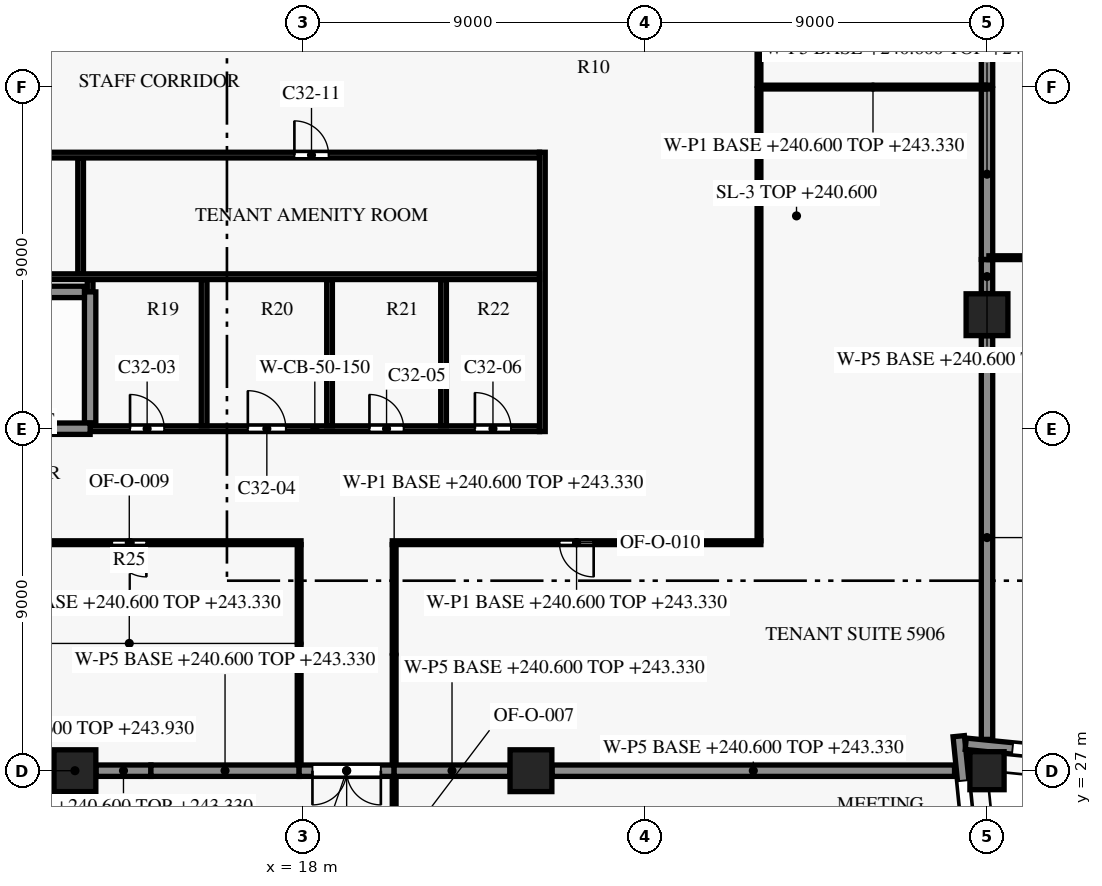
"""IFC4 building model, lengths in metres.
Left out: names, types, materials, properties, quantities, classifications, styles, units other than length and angle.
Written with IfcOpenShell. Run it as: python <this file> out.ifc"""

import sys

from ifc_helpers import new_model, si_unit, direction, frame, frame_2d, origin, origin_2d, place, context, subcontext, project, spatial, rectangle, extrude, element, fill, save


model = new_model("IFC4")
c1 = context("Model", 3, precision=1e-05, world=origin(), true_north=direction((0.0, 1.0)))
c2 = subcontext(c1, "Body", "Model", "MODEL_VIEW")
j1 = project(units=[si_unit("LENGTHUNIT", "METRE"), si_unit("PLANEANGLEUNIT", "RADIAN")], contexts=[c1])
p1 = place(None, origin())
s1 = spatial("IfcSite", under=j1, at=p1, CompositionType="ELEMENT")
p2 = place(p1, origin())
s2 = spatial("IfcBuilding", under=s1, at=p2, CompositionType="ELEMENT")
p3 = place(p2, frame((0.0, 0.0, 240.6)))
s3 = spatial("IfcBuildingStorey", under=s2, at=p3, CompositionType="ELEMENT", Elevation=240.6)
p4 = place(p3, frame((36.0, 27.0, 0.0), z_axis=(0.0, 0.0, 1.0), x_axis=(-0.0995038382, 0.995037178292, 0.0)))
e1 = element("IfcColumn", 1, at=p4, inside=s3, PredefinedType="COLUMN", context=c2, shape_type="SweptSolid", body=[
    extrude(rectangle(XDim=0.9, YDim=1.0, at=origin_2d()), origin(), (0.0, 0.0, 1.0), 3.8),
])
for number, where, z_axis, x_axis in (
    (2, (12.0, 27.0, 0.0), (0.0, 0.0, 1.0), (1.0, 0.0, 0.0)),
    (3, (24.0, 27.0, 0.0), (0.0, 0.0, 1.0), (1.0, 0.0, 0.0)),
    (4, (36.0, 39.0, 0.0), (0.0, 0.0, 1.0), (1.0, 0.0, 0.0)),
):
    element("IfcColumn", number, at=place(p3, frame(where, z_axis=z_axis, x_axis=x_axis)), inside=s3, PredefinedType="COLUMN", context=c2, shape_type="SweptSolid", body=[
        extrude(rectangle(XDim=1.1, YDim=1.1, at=origin_2d()), origin(), (0.0, 0.0, 1.0), 3.8),
    ])
p5 = place(p3, frame((35.256, 27.908, 0.0), z_axis=(0.0, 0.0, 1.0), x_axis=(0.099535070904, -0.995034054523, 0.0)))
e5 = element("IfcWall", 5, at=p5, inside=s3, PredefinedType="SOLIDWALL", context=c2, shape_type="SweptSolid", body=[
    extrude(rectangle(XDim=4.626, YDim=0.3, at=frame_2d((2.313, 0.0))), origin(), (0.0, 0.0, 1.0), 3.15),
])
p6 = place(p5, frame((1.176, 0.0, 0.15)))
e6 = element("IfcOpeningElement", 6, at=p6, cuts=e5, PredefinedType="OPENING", context=c2, shape_type="SweptSolid", body=[
    extrude(rectangle(XDim=3.3, YDim=2.4, at=frame_2d((1.65, 1.2))), frame((0.0, 0.16, 0.0), z_axis=(0.0, -1.0, 0.0), x_axis=(1.0, 0.0, 0.0)), (0.0, 0.0, 1.0), 0.32),
])
p7 = place(p3, frame((45.015, 26.752, 0.0), z_axis=(0.0, 0.0, 1.0), x_axis=(-0.9950379439, 0.099496181828, 0.0)))
e7 = element("IfcWall", 7, at=p7, inside=s3, PredefinedType="SOLIDWALL", context=c2, shape_type="SweptSolid", body=[
    extrude(rectangle(XDim=9.621, YDim=0.3, at=frame_2d((4.811, 0.0))), origin(), (0.0, 0.0, 1.0), 3.15),
])
p8 = place(p7, frame((1.311, 0.0, 0.75)))
e8 = element("IfcOpeningElement", 8, at=p8, cuts=e7, PredefinedType="OPENING", context=c2, shape_type="SweptSolid", body=[
    extrude(rectangle(XDim=1.8, YDim=1.8, at=frame_2d((0.9, 0.9))), frame((0.0, 0.16, 0.0), z_axis=(0.0, -1.0, 0.0), x_axis=(1.0, 0.0, 0.0)), (0.0, 0.0, 1.0), 0.32),
])
p9 = place(p7, frame((5.083, 0.0, 0.15)))
e9 = element("IfcOpeningElement", 9, at=p9, cuts=e7, PredefinedType="OPENING", context=c2, shape_type="SweptSolid", body=[
    extrude(rectangle(XDim=3.3, YDim=2.4, at=frame_2d((1.65, 1.2))), frame((0.0, 0.16, 0.0), z_axis=(0.0, -1.0, 0.0), x_axis=(1.0, 0.0, 0.0)), (0.0, 0.0, 1.0), 0.32),
])
p10 = place(p3, frame((12.4, 36.0, 0.0), z_axis=(0.0, 0.0, 1.0), x_axis=(1.0, 0.0, 0.0)))
e10 = element("IfcWall", 10, at=p10, inside=s3, PredefinedType="SHEAR", context=c2, shape_type="SweptSolid", body=[
    extrude(rectangle(XDim=11.825, YDim=0.15, at=frame_2d((5.913, 0.0))), origin(), (0.0, 0.0, 1.0), 3.5),
])
p11 = place(p10, frame((1.05, 0.0, 0.0)))
e11 = element("IfcOpeningElement", 11, at=p11, cuts=e10, PredefinedType="OPENING", context=c2, shape_type="SweptSolid", body=[
    extrude(rectangle(XDim=0.9, YDim=2.1, at=frame_2d((0.45, 1.05))), frame((0.0, 0.085, 0.0), z_axis=(0.0, -1.0, 0.0), x_axis=(1.0, 0.0, 0.0)), (0.0, 0.0, 1.0), 0.17),
])
p12 = place(p10, frame((4.15, 0.0, 0.0)))
e12 = element("IfcOpeningElement", 12, at=p12, cuts=e10, PredefinedType="OPENING", context=c2, shape_type="SweptSolid", body=[
    extrude(rectangle(XDim=1.0, YDim=2.1, at=frame_2d((0.5, 1.05))), frame((0.0, 0.085, 0.0), z_axis=(0.0, -1.0, 0.0), x_axis=(1.0, 0.0, 0.0)), (0.0, 0.0, 1.0), 0.17),
])
p13 = place(p10, frame((7.35, 0.0, 0.0)))
e13 = element("IfcOpeningElement", 13, at=p13, cuts=e10, PredefinedType="OPENING", context=c2, shape_type="SweptSolid", body=[
    extrude(rectangle(XDim=0.9, YDim=2.1, at=frame_2d((0.45, 1.05))), frame((0.0, 0.085, 0.0), z_axis=(0.0, -1.0, 0.0), x_axis=(1.0, 0.0, 0.0)), (0.0, 0.0, 1.0), 0.17),
])
p14 = place(p10, frame((10.125, 0.0, 0.0)))
e14 = element("IfcOpeningElement", 14, at=p14, cuts=e10, PredefinedType="OPENING", context=c2, shape_type="SweptSolid", body=[
    extrude(rectangle(XDim=0.95, YDim=2.1, at=frame_2d((0.475, 1.05))), frame((0.0, 0.085, 0.0), z_axis=(0.0, -1.0, 0.0), x_axis=(1.0, 0.0, 0.0)), (0.0, 0.0, 1.0), 0.17),
])
p15 = place(p3, frame((4.4, 36.0, 0.0), z_axis=(0.0, 0.0, 1.0), x_axis=(1.0, 0.0, 0.0)))
e15 = element("IfcWall", 15, at=p15, inside=s3, PredefinedType="SHEAR", context=c2, shape_type="SweptSolid", body=[
    extrude(rectangle(XDim=8.0, YDim=0.3, at=frame_2d((4.0, 0.0))), origin(), (0.0, 0.0, 1.0), 3.5),
])
p16 = place(p15, frame((0.3, 0.0, 0.0)))
e16 = element("IfcOpeningElement", 16, at=p16, cuts=e15, PredefinedType="OPENING", context=c2, shape_type="SweptSolid", body=[
    extrude(rectangle(XDim=1.5, YDim=2.2, at=frame_2d((0.75, 1.1))), frame((0.0, 0.16, 0.0), z_axis=(0.0, -1.0, 0.0), x_axis=(1.0, 0.0, 0.0)), (0.0, 0.0, 1.0), 0.32),
])
p17 = place(p3, frame((4.55, 39.6, 0.0), z_axis=(0.0, 0.0, 1.0), x_axis=(1.0, 0.0, 0.0)))
e17 = element("IfcWall", 17, at=p17, inside=s3, PredefinedType="SHEAR", context=c2, shape_type="SweptSolid", body=[
    extrude(rectangle(XDim=7.7, YDim=0.3, at=frame_2d((3.85, 0.0))), origin(), (0.0, 0.0, 1.0), 3.5),
])
p18 = place(p3, frame((8.1, 40.0, 0.0), z_axis=(0.0, 0.0, 1.0), x_axis=(1.0, 0.0, 0.0)))
e18 = element("IfcWall", 18, at=p18, inside=s3, PredefinedType="PARTITIONING", context=c2, shape_type="SweptSolid", body=[
    extrude(rectangle(XDim=16.125, YDim=0.15, at=frame_2d((8.062, 0.0))), origin(), (0.0, 0.0, 1.0), 3.5),
])
p19 = place(p3, frame((8.1, 43.2, 0.0), z_axis=(0.0, 0.0, 1.0), x_axis=(1.0, 0.0, 0.0)))
e19 = element("IfcWall", 19, at=p19, inside=s3, PredefinedType="PARTITIONING", context=c2, shape_type="SweptSolid", body=[
    extrude(rectangle(XDim=16.125, YDim=0.15, at=frame_2d((8.062, 0.0))), origin(), (0.0, 0.0, 1.0), 3.5),
])
p20 = place(p19, frame((1.575, 0.0, 0.0)))
e20 = element("IfcOpeningElement", 20, at=p20, cuts=e19, PredefinedType="OPENING", context=c2, shape_type="SweptSolid", body=[
    extrude(rectangle(XDim=0.9, YDim=2.1, at=frame_2d((0.45, 1.05))), frame((0.0, 0.085, 0.0), z_axis=(0.0, -1.0, 0.0), x_axis=(1.0, 0.0, 0.0)), (0.0, 0.0, 1.0), 0.17),
])
p21 = place(p19, frame((9.675, 0.0, 0.0)))
e21 = element("IfcOpeningElement", 21, at=p21, cuts=e19, PredefinedType="OPENING", context=c2, shape_type="SweptSolid", body=[
    extrude(rectangle(XDim=0.9, YDim=2.1, at=frame_2d((0.45, 1.05))), frame((0.0, 0.085, 0.0), z_axis=(0.0, -1.0, 0.0), x_axis=(1.0, 0.0, 0.0)), (0.0, 0.0, 1.0), 0.17),
])
p22 = place(p3, frame((12.15, 40.075, 0.0), z_axis=(0.0, 0.0, 1.0), x_axis=(0.0, 1.0, 0.0)))
e22 = element("IfcWall", 22, at=p22, inside=s3, PredefinedType="PARTITIONING", context=c2, shape_type="SweptSolid", body=[
    extrude(rectangle(XDim=3.05, YDim=0.15, at=frame_2d((1.525, 0.0))), origin(), (0.0, 0.0, 1.0), 3.5),
])
p23 = place(p3, frame((12.4, 39.6, 0.0), z_axis=(0.0, 0.0, 1.0), x_axis=(0.0, 1.0, 0.0)))
e23 = element("IfcWall", 23, at=p23, inside=s3, PredefinedType="PARTITIONING", context=c2, shape_type="SweptSolid", body=[
    extrude(rectangle(XDim=0.325, YDim=0.15, at=frame_2d((0.163, 0.0))), origin(), (0.0, 0.0, 1.0), 3.5),
])
p24 = place(p3, frame((12.4, 36.15, 0.0), z_axis=(0.0, 0.0, 1.0), x_axis=(0.0, 1.0, 0.0)))
e24 = element("IfcWall", 24, at=p24, inside=s3, PredefinedType="SHEAR", context=c2, shape_type="SweptSolid", body=[
    extrude(rectangle(XDim=3.45, YDim=0.3, at=frame_2d((1.725, 0.0))), origin(), (0.0, 0.0, 1.0), 3.5),
])
for number, where, z_axis, x_axis in (
    (25, (15.4, 36.075, 0.0), (0.0, 0.0, 1.0), (0.0, 1.0, 0.0)),
    (26, (18.7, 36.075, 0.0), (0.0, 0.0, 1.0), (0.0, 1.0, 0.0)),
    (27, (21.7, 36.075, 0.0), (0.0, 0.0, 1.0), (0.0, 1.0, 0.0)),
):
    element("IfcWall", number, at=place(p3, frame(where, z_axis=z_axis, x_axis=x_axis)), inside=s3, PredefinedType="PARTITIONING", context=c2, shape_type="SweptSolid", body=[
        extrude(rectangle(XDim=3.85, YDim=0.15, at=frame_2d((1.925, 0.0))), origin(), (0.0, 0.0, 1.0), 3.5),
    ])
p25 = place(p3, frame((24.3, 35.925, 0.0), z_axis=(0.0, 0.0, 1.0), x_axis=(0.0, 1.0, 0.0)))
e28 = element("IfcWall", 28, at=p25, inside=s3, PredefinedType="PARTITIONING", context=c2, shape_type="SweptSolid", body=[
    extrude(rectangle(XDim=7.35, YDim=0.15, at=frame_2d((3.675, 0.0))), origin(), (0.0, 0.0, 1.0), 3.5),
])
p26 = place(p3, frame((20.4, 26.83, 0.0), z_axis=(0.0, 0.0, 1.0), x_axis=(0.0, -1.0, 0.0)))
e29 = element("IfcWall", 29, at=p26, inside=s3, PredefinedType="PARTITIONING", context=c2, shape_type="SweptSolid", body=[
    extrude(rectangle(XDim=4.28, YDim=0.1, at=frame_2d((2.14, 0.0))), origin(), (0.0, 0.0, 1.0), 2.73),
])
p27 = place(p26, frame((1.18, 0.0, 0.0)))
e30 = element("IfcOpeningElement", 30, at=p27, cuts=e29, PredefinedType="OPENING", context=c2, shape_type="SweptSolid", body=[
    extrude(rectangle(XDim=1.8, YDim=2.1, at=frame_2d((0.9, 1.05))), frame((0.0, 0.06, 0.0), z_axis=(0.0, -1.0, 0.0), x_axis=(1.0, 0.0, 0.0)), (0.0, 0.0, 1.0), 0.12),
])
p28 = place(p3, frame((10.9, 27.0, 0.0), z_axis=(0.0, 0.0, 1.0), x_axis=(1.0, 0.0, 0.0)))
e31 = element("IfcWall", 31, at=p28, inside=s3, PredefinedType="PARTITIONING", context=c2, shape_type="SweptSolid", body=[
    extrude(rectangle(XDim=0.545, YDim=0.3, at=frame_2d((0.272, 0.0))), origin(), (0.0, 0.0, 1.0), 3.33),
])
p29 = place(p3, frame((12.555, 27.0, 0.0), z_axis=(0.0, 0.0, 1.0), x_axis=(1.0, 0.0, 0.0)))
e32 = element("IfcWall", 32, at=p29, inside=s3, PredefinedType="PARTITIONING", context=c2, shape_type="SweptSolid", body=[
    extrude(rectangle(XDim=1.445, YDim=0.3, at=frame_2d((0.723, 0.0))), origin(), (0.0, 0.0, 1.0), 2.73),
])
p30 = place(p3, frame((14.0, 27.0, 0.0), z_axis=(0.0, 0.0, 1.0), x_axis=(1.0, 0.0, 0.0)))
e33 = element("IfcWall", 33, at=p30, inside=s3, PredefinedType="PARTITIONING", context=c2, shape_type="SweptSolid", body=[
    extrude(rectangle(XDim=3.9, YDim=0.3, at=frame_2d((1.95, 0.0))), origin(), (0.0, 0.0, 1.0), 2.73),
])
p31 = place(p3, frame((20.4, 27.0, 0.0), z_axis=(0.0, 0.0, 1.0), x_axis=(-1.0, 0.0, 0.0)))
e34 = element("IfcWall", 34, at=p31, inside=s3, PredefinedType="PARTITIONING", context=c2, shape_type="SweptSolid", body=[
    extrude(rectangle(XDim=2.5, YDim=0.3, at=frame_2d((1.25, 0.0))), origin(), (0.0, 0.0, 1.0), 2.73),
])
p32 = place(p31, frame((0.35, 0.0, 0.0)))
e35 = element("IfcOpeningElement", 35, at=p32, cuts=e34, PredefinedType="OPENING", context=c2, shape_type="SweptSolid", body=[
    extrude(rectangle(XDim=1.8, YDim=2.1, at=frame_2d((0.9, 1.05))), frame((0.0, 0.16, 0.0), z_axis=(0.0, -1.0, 0.0), x_axis=(1.0, 0.0, 0.0)), (0.0, 0.0, 1.0), 0.32),
])
p33 = place(p3, frame((20.4, 27.0, 0.0), z_axis=(0.0, 0.0, 1.0), x_axis=(1.0, 0.0, 0.0)))
e36 = element("IfcWall", 36, at=p33, inside=s3, PredefinedType="PARTITIONING", context=c2, shape_type="SweptSolid", body=[
    extrude(rectangle(XDim=3.045, YDim=0.3, at=frame_2d((1.522, 0.0))), origin(), (0.0, 0.0, 1.0), 2.73),
])
p34 = place(p3, frame((24.555, 27.0, 0.0), z_axis=(0.0, 0.0, 1.0), x_axis=(1.0, 0.0, 0.0)))
e37 = element("IfcWall", 37, at=p34, inside=s3, PredefinedType="PARTITIONING", context=c2, shape_type="SweptSolid", body=[
    extrude(rectangle(XDim=10.591, YDim=0.3, at=frame_2d((5.295, 0.0))), origin(), (0.0, 0.0, 1.0), 2.73),
])
p35 = place(p3, frame((17.9, 27.17, 0.0), z_axis=(0.0, 0.0, 1.0), x_axis=(0.0, 1.0, 0.0)))
e38 = element("IfcWall", 38, at=p35, inside=s3, PredefinedType="PARTITIONING", context=c2, shape_type="SweptSolid", body=[
    extrude(rectangle(XDim=5.78, YDim=0.1, at=frame_2d((2.89, 0.0))), origin(), (0.0, 0.0, 1.0), 2.73),
])
p36 = place(p3, frame((36.0, 27.824, 0.0), z_axis=(0.0, 0.0, 1.0), x_axis=(0.0, 1.0, 0.0)))
e39 = element("IfcWall", 39, at=p36, inside=s3, PredefinedType="PARTITIONING", context=c2, shape_type="SweptSolid", body=[
    extrude(rectangle(XDim=10.621, YDim=0.3, at=frame_2d((5.311, 0.0))), origin(), (0.0, 0.0, 1.0), 2.73),
])
p37 = place(p3, frame((20.4, 32.95, 0.0), z_axis=(0.0, 0.0, 1.0), x_axis=(0.0, -1.0, 0.0)))
e40 = element("IfcWall", 40, at=p37, inside=s3, PredefinedType="PARTITIONING", context=c2, shape_type="SweptSolid", body=[
    extrude(rectangle(XDim=5.78, YDim=0.1, at=frame_2d((2.89, 0.0))), origin(), (0.0, 0.0, 1.0), 2.73),
])
p38 = place(p3, frame((17.95, 33.0, 0.0), z_axis=(0.0, 0.0, 1.0), x_axis=(-1.0, 0.0, 0.0)))
e41 = element("IfcWall", 41, at=p38, inside=s3, PredefinedType="PARTITIONING", context=c2, shape_type="SweptSolid", body=[
    extrude(rectangle(XDim=8.99, YDim=0.1, at=frame_2d((4.495, 0.0))), origin(), (0.0, 0.0, 1.0), 2.73),
])
p39 = place(p38, frame((4.07, 0.0, 0.0)))
e42 = element("IfcOpeningElement", 42, at=p39, cuts=e41, PredefinedType="OPENING", context=c2, shape_type="SweptSolid", body=[
    extrude(rectangle(XDim=0.9, YDim=2.1, at=frame_2d((0.45, 1.05))), frame((0.0, 0.06, 0.0), z_axis=(0.0, -1.0, 0.0), x_axis=(1.0, 0.0, 0.0)), (0.0, 0.0, 1.0), 0.12),
])
p40 = place(p3, frame((30.05, 33.0, 0.0), z_axis=(0.0, 0.0, 1.0), x_axis=(-1.0, 0.0, 0.0)))
e43 = element("IfcWall", 43, at=p40, inside=s3, PredefinedType="PARTITIONING", context=c2, shape_type="SweptSolid", body=[
    extrude(rectangle(XDim=9.7, YDim=0.1, at=frame_2d((4.85, 0.0))), origin(), (0.0, 0.0, 1.0), 2.73),
])
p41 = place(p40, frame((4.4, 0.0, 0.0)))
e44 = element("IfcOpeningElement", 44, at=p41, cuts=e43, PredefinedType="OPENING", context=c2, shape_type="SweptSolid", body=[
    extrude(rectangle(XDim=0.9, YDim=2.1, at=frame_2d((0.45, 1.05))), frame((0.0, 0.06, 0.0), z_axis=(0.0, -1.0, 0.0), x_axis=(1.0, 0.0, 0.0)), (0.0, 0.0, 1.0), 0.12),
])
p42 = place(p3, frame((36.0, 39.555, 0.0), z_axis=(0.0, 0.0, 1.0), x_axis=(0.0, 1.0, 0.0)))
e45 = element("IfcWall", 45, at=p42, inside=s3, PredefinedType="PARTITIONING", context=c2, shape_type="SweptSolid", body=[
    extrude(rectangle(XDim=0.895, YDim=0.3, at=frame_2d((0.448, 0.0))), origin(), (0.0, 0.0, 1.0), 2.73),
])
p43 = place(p3, frame((49.45, 40.5, 0.0), z_axis=(0.0, 0.0, 1.0), x_axis=(-1.0, 0.0, 0.0)))
e46 = element("IfcWall", 46, at=p43, inside=s3, PredefinedType="PARTITIONING", context=c2, shape_type="SweptSolid", body=[
    extrude(rectangle(XDim=13.4, YDim=0.1, at=frame_2d((6.7, 0.0))), origin(), (0.0, 0.0, 1.0), 2.73),
])
p44 = place(p43, frame((8.05, 0.0, 0.0)))
e47 = element("IfcOpeningElement", 47, at=p44, cuts=e46, PredefinedType="OPENING", context=c2, shape_type="SweptSolid", body=[
    extrude(rectangle(XDim=1.8, YDim=2.1, at=frame_2d((0.9, 1.05))), frame((0.0, 0.06, 0.0), z_axis=(0.0, -1.0, 0.0), x_axis=(1.0, 0.0, 0.0)), (0.0, 0.0, 1.0), 0.12),
])
p45 = place(p3, frame((36.0, 40.455, 0.0), z_axis=(0.0, 0.0, 1.0), x_axis=(0.0, 1.0, 0.0)))
e48 = element("IfcWall", 48, at=p45, inside=s3, PredefinedType="PARTITIONING", context=c2, shape_type="SweptSolid", body=[
    extrude(rectangle(XDim=4.485, YDim=0.3, at=frame_2d((2.242, 0.0))), origin(), (0.0, 0.0, 1.0), 2.73),
])
p46 = place(p3, frame((30.0, 44.94, 0.0), z_axis=(0.0, 0.0, 1.0), x_axis=(0.0, -1.0, 0.0)))
e49 = element("IfcWall", 49, at=p46, inside=s3, PredefinedType="PARTITIONING", context=c2, shape_type="SweptSolid", body=[
    extrude(rectangle(XDim=11.89, YDim=0.1, at=frame_2d((5.945, 0.0))), origin(), (0.0, 0.0, 1.0), 3.33),
])
p47 = place(p3, frame((30.05, 44.99, 0.0), z_axis=(0.0, 0.0, 1.0), x_axis=(1.0, 0.0, 0.0)))
e50 = element("IfcWall", 50, at=p47, inside=s3, PredefinedType="PARTITIONING", context=c2, shape_type="SweptSolid", body=[
    extrude(rectangle(XDim=5.9, YDim=0.1, at=frame_2d((2.95, 0.0))), origin(), (0.0, 0.0, 1.0), 2.73),
])
p48 = place(p3, frame((36.0, 45.04, 0.0), z_axis=(0.0, 0.0, 1.0), x_axis=(0.0, 1.0, 0.0)))
e51 = element("IfcWall", 51, at=p48, inside=s3, PredefinedType="PARTITIONING", context=c2, shape_type="SweptSolid", body=[
    extrude(rectangle(XDim=2.91, YDim=0.3, at=frame_2d((1.455, 0.0))), origin(), (0.0, 0.0, 1.0), 2.73),
])
p49 = place(p3, frame((30.0, 54.95, 0.0), z_axis=(0.0, 0.0, 1.0), x_axis=(0.0, -1.0, 0.0)))
e52 = element("IfcWall", 52, at=p49, inside=s3, PredefinedType="PARTITIONING", context=c2, shape_type="SweptSolid", body=[
    extrude(rectangle(XDim=9.91, YDim=0.1, at=frame_2d((4.955, 0.0))), origin(), (0.0, 0.0, 1.0), 3.33),
])
p50 = place(p49, frame((4.505, 0.0, 0.0)))
e53 = element("IfcOpeningElement", 53, at=p50, cuts=e52, PredefinedType="OPENING", context=c2, shape_type="SweptSolid", body=[
    extrude(rectangle(XDim=0.9, YDim=2.1, at=frame_2d((0.45, 1.05))), frame((0.0, 0.06, 0.0), z_axis=(0.0, -1.0, 0.0), x_axis=(1.0, 0.0, 0.0)), (0.0, 0.0, 1.0), 0.12),
])
p51 = place(p6, origin())
e54 = element("IfcWindow", 54, at=p51, inside=s3, PartitioningType="SINGLE_PANEL", PredefinedType="WINDOW", context=c2, shape_type="SweptSolid", body=[
    extrude(rectangle(XDim=3.3, YDim=2.4, at=frame_2d((1.65, 1.2))), frame((0.0, 0.03, 0.0), z_axis=(0.0, -1.0, 0.0), x_axis=(1.0, 0.0, 0.0)), (0.0, 0.0, 1.0), 0.06),
])
fill(e6, e54)
p52 = place(p9, origin())
e55 = element("IfcWindow", 55, at=p52, inside=s3, PartitioningType="SINGLE_PANEL", PredefinedType="WINDOW", context=c2, shape_type="SweptSolid", body=[
    extrude(rectangle(XDim=3.3, YDim=2.4, at=frame_2d((1.65, 1.2))), frame((0.0, 0.03, 0.0), z_axis=(0.0, -1.0, 0.0), x_axis=(1.0, 0.0, 0.0)), (0.0, 0.0, 1.0), 0.06),
])
fill(e9, e55)
p53 = place(p11, origin())
e56 = element("IfcDoor", 56, at=p53, inside=s3, OperationType="SINGLE_SWING_RIGHT", PredefinedType="DOOR", context=c2, shape_type="SweptSolid", body=[
    extrude(rectangle(XDim=0.9, YDim=2.1, at=frame_2d((0.45, 1.05))), frame((0.0, 0.025, 0.0), z_axis=(0.0, -1.0, 0.0), x_axis=(1.0, 0.0, 0.0)), (0.0, 0.0, 1.0), 0.05),
])
fill(e11, e56)
p54 = place(p12, origin())
e57 = element("IfcDoor", 57, at=p54, inside=s3, OperationType="SINGLE_SWING_LEFT", PredefinedType="DOOR", context=c2, shape_type="SweptSolid", body=[
    extrude(rectangle(XDim=1.0, YDim=2.1, at=frame_2d((0.5, 1.05))), frame((0.0, 0.025, 0.0), z_axis=(0.0, -1.0, 0.0), x_axis=(1.0, 0.0, 0.0)), (0.0, 0.0, 1.0), 0.05),
])
fill(e12, e57)
p55 = place(p13, origin())
e58 = element("IfcDoor", 58, at=p55, inside=s3, OperationType="SINGLE_SWING_RIGHT", PredefinedType="DOOR", context=c2, shape_type="SweptSolid", body=[
    extrude(rectangle(XDim=0.9, YDim=2.1, at=frame_2d((0.45, 1.05))), frame((0.0, 0.025, 0.0), z_axis=(0.0, -1.0, 0.0), x_axis=(1.0, 0.0, 0.0)), (0.0, 0.0, 1.0), 0.05),
])
fill(e13, e58)
p56 = place(p14, origin())
e59 = element("IfcDoor", 59, at=p56, inside=s3, OperationType="SINGLE_SWING_LEFT", PredefinedType="DOOR", context=c2, shape_type="SweptSolid", body=[
    extrude(rectangle(XDim=0.95, YDim=2.1, at=frame_2d((0.475, 1.05))), frame((0.0, 0.025, 0.0), z_axis=(0.0, -1.0, 0.0), x_axis=(1.0, 0.0, 0.0)), (0.0, 0.0, 1.0), 0.05),
])
fill(e14, e59)
p57 = place(p21, origin())
e60 = element("IfcDoor", 60, at=p57, inside=s3, OperationType="SINGLE_SWING_LEFT", PredefinedType="DOOR", context=c2, shape_type="SweptSolid", body=[
    extrude(rectangle(XDim=0.9, YDim=2.1, at=frame_2d((0.45, 1.05))), frame((0.0, 0.025, 0.0), z_axis=(0.0, -1.0, 0.0), x_axis=(1.0, 0.0, 0.0)), (0.0, 0.0, 1.0), 0.05),
])
fill(e21, e60)
p58 = place(p39, origin())
e61 = element("IfcDoor", 61, at=p58, inside=s3, OperationType="SINGLE_SWING_RIGHT", PredefinedType="DOOR", context=c2, shape_type="SweptSolid", body=[
    extrude(rectangle(XDim=0.9, YDim=2.1, at=frame_2d((0.45, 1.05))), frame((0.0, 0.025, 0.0), z_axis=(0.0, -1.0, 0.0), x_axis=(1.0, 0.0, 0.0)), (0.0, 0.0, 1.0), 0.05),
])
fill(e42, e61)
p59 = place(p41, origin())
e62 = element("IfcDoor", 62, at=p59, inside=s3, OperationType="SINGLE_SWING_LEFT", PredefinedType="DOOR", context=c2, shape_type="SweptSolid", body=[
    extrude(rectangle(XDim=0.9, YDim=2.1, at=frame_2d((0.45, 1.05))), frame((0.0, 0.025, 0.0), z_axis=(0.0, -1.0, 0.0), x_axis=(1.0, 0.0, 0.0)), (0.0, 0.0, 1.0), 0.05),
])
fill(e44, e62)
p60 = place(p32, origin())
e63 = element("IfcDoor", 63, at=p60, inside=s3, OperationType="DOUBLE_DOOR_SINGLE_SWING", PredefinedType="DOOR", context=c2, shape_type="SweptSolid", body=[
    extrude(rectangle(XDim=1.8, YDim=2.1, at=frame_2d((0.9, 1.05))), frame((0.0, 0.025, 0.0), z_axis=(0.0, -1.0, 0.0), x_axis=(1.0, 0.0, 0.0)), (0.0, 0.0, 1.0), 0.05),
])
fill(e35, e63)
save(model, sys.argv[1])
